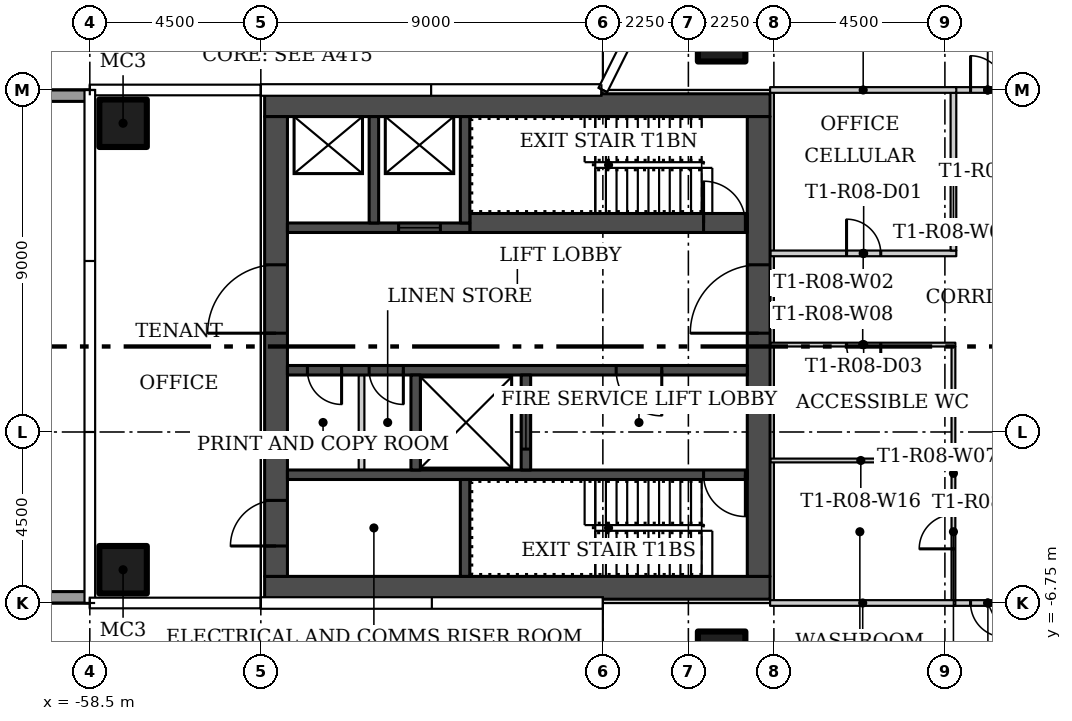
"""IFC4 building model, lengths in metres.
Left out: names, types, materials, properties, quantities, classifications, styles, units other than length and angle.
Written with IfcOpenShell. Run it as: python <this file> out.ifc"""

import sys

from ifc_helpers import new_model, si_unit, direction, frame, frame_2d, origin, origin_2d, place, context, subcontext, project, spatial, rectangle, hollow_rectangle, extrude, element, fill, save


model = new_model("IFC4")
c1 = context("Model", 3, precision=1e-05, world=origin(), true_north=direction((0.0, 1.0)))
c2 = subcontext(c1, "Body", "Model", "MODEL_VIEW")
j1 = project(units=[si_unit("LENGTHUNIT", "METRE"), si_unit("PLANEANGLEUNIT", "RADIAN")], contexts=[c1])
p1 = place(None, origin())
s1 = spatial("IfcSite", under=j1, at=p1, CompositionType="ELEMENT")
p2 = place(p1, origin())
s2 = spatial("IfcBuilding", under=s1, at=p2, CompositionType="ELEMENT")
p3 = place(p2, frame((0.0, 0.0, 81.9)))
s3 = spatial("IfcBuildingStorey", under=s2, at=p3, CompositionType="ELEMENT", Elevation=81.9)
for number, where in (
    (1, (-41.875, 8.125, 0.0)),
    (2, (-41.875, -8.125, 0.0)),
    (3, (-57.625, -5.875, 0.0)),
    (4, (-57.625, 5.875, 0.0)),
):
    element("IfcColumn", number, at=place(p3, frame(where)), inside=s3, PredefinedType="COLUMN", context=c2, shape_type="SweptSolid", body=[
        extrude(hollow_rectangle(XDim=1.25, YDim=1.25, WallThickness=0.05, at=origin_2d()), origin(), (0.0, 0.0, 1.0), 3.55),
    ])
p4 = place(p3, frame((-40.6, 2.45, 0.0)))
e5 = element("IfcWall", 5, at=p4, inside=s3, PredefinedType="PARTITIONING", context=c2, shape_type="SweptSolid", body=[
    extrude(rectangle(XDim=4.9, YDim=0.15, at=frame_2d((2.45, 0.0))), origin(), (0.0, 0.0, 1.0), 3.55),
])
p5 = place(p4, frame((2.012, 0.0, 0.0)))
e6 = element("IfcOpeningElement", 6, at=p5, cuts=e5, PredefinedType="OPENING", context=c2, shape_type="SweptSolid", body=[
    extrude(rectangle(XDim=0.9, YDim=2.1, at=frame_2d((0.45, 1.05))), frame((0.0, 0.085, 0.0), z_axis=(0.0, -1.0, 0.0), x_axis=(1.0, 0.0, 0.0)), (0.0, 0.0, 1.0), 0.17),
])
p6 = place(p3, frame((-35.775, 2.525, 0.0), z_axis=(0.0, 0.0, 1.0), x_axis=(0.0, 1.0, 0.0)))
e7 = element("IfcWall", 7, at=p6, inside=s3, PredefinedType="PARTITIONING", context=c2, shape_type="SweptSolid", body=[
    extrude(rectangle(XDim=4.15, YDim=0.15, at=frame_2d((2.075, 0.0))), origin(), (0.0, 0.0, 1.0), 3.55),
])
p7 = place(p3, frame((-35.775, -6.675, 0.0), z_axis=(0.0, 0.0, 1.0), x_axis=(0.0, 1.0, 0.0)))
e8 = element("IfcWall", 8, at=p7, inside=s3, PredefinedType="PARTITIONING", context=c2, shape_type="SweptSolid", body=[
    extrude(rectangle(XDim=6.675, YDim=0.1, at=frame_2d((3.337, 0.0))), origin(), (0.0, 0.0, 1.0), 3.55),
])
p8 = place(p7, frame((1.35, 0.0, 0.0)))
e9 = element("IfcOpeningElement", 9, at=p8, cuts=e8, PredefinedType="OPENING", context=c2, shape_type="SweptSolid", body=[
    extrude(rectangle(XDim=0.9, YDim=2.1, at=frame_2d((0.45, 1.05))), frame((0.0, 0.06, 0.0), z_axis=(0.0, -1.0, 0.0), x_axis=(1.0, 0.0, 0.0)), (0.0, 0.0, 1.0), 0.12),
])
p9 = place(p3, frame((-35.725, 0.05, 0.0), z_axis=(0.0, 0.0, 1.0), x_axis=(-1.0, 0.0, 0.0)))
e10 = element("IfcWall", 10, at=p9, inside=s3, PredefinedType="PARTITIONING", context=c2, shape_type="SweptSolid", body=[
    extrude(rectangle(XDim=4.875, YDim=0.1, at=frame_2d((2.438, 0.0))), origin(), (0.0, 0.0, 1.0), 3.55),
])
p10 = place(p9, frame((1.962, 0.0, 0.0)))
e11 = element("IfcOpeningElement", 11, at=p10, cuts=e10, PredefinedType="OPENING", context=c2, shape_type="SweptSolid", body=[
    extrude(rectangle(XDim=0.9, YDim=2.1, at=frame_2d((0.45, 1.05))), frame((0.0, 0.06, 0.0), z_axis=(0.0, -1.0, 0.0), x_axis=(1.0, 0.0, 0.0)), (0.0, 0.0, 1.0), 0.12),
])
p11 = place(p3, frame((-35.85, 6.75, 0.0)))
e12 = element("IfcWall", 12, at=p11, inside=s3, PredefinedType="PARTITIONING", context=c2, shape_type="SweptSolid", body=[
    extrude(rectangle(XDim=1.951, YDim=0.15, at=frame_2d((0.975, 0.0))), origin(), (0.0, 0.0, 1.0), 3.55),
])
p12 = place(p11, frame((0.525, 0.0, 0.0)))
e13 = element("IfcOpeningElement", 13, at=p12, cuts=e12, PredefinedType="OPENING", context=c2, shape_type="SweptSolid", body=[
    extrude(rectangle(XDim=0.9, YDim=2.1, at=frame_2d((0.45, 1.05))), frame((0.0, 0.085, 0.0), z_axis=(0.0, -1.0, 0.0), x_axis=(1.0, 0.0, 0.0)), (0.0, 0.0, 1.0), 0.17),
])
p13 = place(p3, frame((-33.912, -6.75, 0.0), z_axis=(0.0, 0.0, 1.0), x_axis=(-1.0, 0.0, 0.0)))
e14 = element("IfcWall", 14, at=p13, inside=s3, PredefinedType="PARTITIONING", context=c2, shape_type="SweptSolid", body=[
    extrude(rectangle(XDim=1.913, YDim=0.15, at=frame_2d((0.957, 0.0))), origin(), (0.0, 0.0, 1.0), 3.55),
])
p14 = place(p13, frame((0.513, 0.0, 0.0)))
e15 = element("IfcOpeningElement", 15, at=p14, cuts=e14, PredefinedType="OPENING", context=c2, shape_type="SweptSolid", body=[
    extrude(rectangle(XDim=0.9, YDim=2.1, at=frame_2d((0.45, 1.05))), frame((0.0, 0.085, 0.0), z_axis=(0.0, -1.0, 0.0), x_axis=(1.0, 0.0, 0.0)), (0.0, 0.0, 1.0), 0.17),
])
p15 = place(p3, frame((-35.7, 6.75, 0.0), z_axis=(0.0, 0.0, 1.0), x_axis=(-1.0, 0.0, 0.0)))
e16 = element("IfcWall", 16, at=p15, inside=s3, PredefinedType="PARTITIONING", context=c2, shape_type="SweptSolid", body=[
    extrude(rectangle(XDim=4.9, YDim=0.15, at=frame_2d((2.45, 0.0))), origin(), (0.0, 0.0, 1.0), 3.55),
])
p16 = place(p3, frame((-40.6, -6.75, 0.0)))
e17 = element("IfcWall", 17, at=p16, inside=s3, PredefinedType="PARTITIONING", context=c2, shape_type="SweptSolid", body=[
    extrude(rectangle(XDim=4.875, YDim=0.15, at=frame_2d((2.438, 0.0))), origin(), (0.0, 0.0, 1.0), 3.55),
])
p17 = place(p3, frame((-35.825, -3.0, 0.0), z_axis=(0.0, 0.0, 1.0), x_axis=(-1.0, 0.0, 0.0)))
e18 = element("IfcWall", 18, at=p17, inside=s3, PredefinedType="PARTITIONING", context=c2, shape_type="SweptSolid", body=[
    extrude(rectangle(XDim=4.775, YDim=0.1, at=frame_2d((2.387, 0.0))), origin(), (0.0, 0.0, 1.0), 3.55),
])
p18 = place(p3, frame((-58.5, 6.6, 0.0), z_axis=(0.0, 0.0, 1.0), x_axis=(-1.0, 0.0, 0.0)))
e19 = element("IfcWall", 19, at=p18, inside=s3, PredefinedType="PARAPET", context=c2, shape_type="SweptSolid", body=[
    extrude(rectangle(XDim=4.5, YDim=0.3, at=frame_2d((2.25, 0.0))), origin(), (0.0, 0.0, 1.0), 1.1),
])
p19 = place(p3, frame((-62.7, -6.6, 0.0)))
e20 = element("IfcWall", 20, at=p19, inside=s3, PredefinedType="PARAPET", context=c2, shape_type="SweptSolid", body=[
    extrude(rectangle(XDim=4.2, YDim=0.3, at=frame_2d((2.1, 0.0))), origin(), (0.0, 0.0, 1.0), 1.1),
])
for number, where, z_axis, x_axis in (
    (21, (-40.6, -6.35, 0.0), (0.0, 0.0, 1.0), (-1.0, 0.0, 0.0)),
    (22, (-40.6, 6.35, 0.0), (0.0, 0.0, 1.0), (-1.0, 0.0, 0.0)),
):
    element("IfcWall", number, at=place(p3, frame(where, z_axis=z_axis, x_axis=x_axis)), inside=s3, PredefinedType="SHEAR", context=c2, shape_type="SweptSolid", body=[
        extrude(rectangle(XDim=13.3, YDim=0.6, at=frame_2d((6.65, 0.0))), origin(), (0.0, 0.0, 1.0), 3.55),
    ])
p20 = place(p3, frame((-40.9, -6.05, 0.0), z_axis=(0.0, 0.0, 1.0), x_axis=(0.0, 1.0, 0.0)))
e23 = element("IfcWall", 23, at=p20, inside=s3, PredefinedType="SHEAR", context=c2, shape_type="SweptSolid", body=[
    extrude(rectangle(XDim=12.1, YDim=0.6, at=frame_2d((6.05, 0.0))), origin(), (0.0, 0.0, 1.0), 3.55),
])
p21 = place(p20, frame((6.4, 0.0, 0.0)))
e24 = element("IfcOpeningElement", 24, at=p21, cuts=e23, PredefinedType="OPENING", context=c2, shape_type="SweptSolid", body=[
    extrude(rectangle(XDim=1.8, YDim=2.4, at=frame_2d((0.9, 1.2))), frame((0.0, 0.31, 0.0), z_axis=(0.0, -1.0, 0.0), x_axis=(1.0, 0.0, 0.0)), (0.0, 0.0, 1.0), 0.62),
])
p22 = place(p3, frame((-53.6, -6.05, 0.0), z_axis=(0.0, 0.0, 1.0), x_axis=(0.0, 1.0, 0.0)))
e25 = element("IfcWall", 25, at=p22, inside=s3, PredefinedType="SHEAR", context=c2, shape_type="SweptSolid", body=[
    extrude(rectangle(XDim=12.1, YDim=0.6, at=frame_2d((6.05, 0.0))), origin(), (0.0, 0.0, 1.0), 3.55),
])
p23 = place(p22, frame((0.8, 0.0, 0.0)))
e26 = element("IfcOpeningElement", 26, at=p23, cuts=e25, PredefinedType="OPENING", context=c2, shape_type="SweptSolid", body=[
    extrude(rectangle(XDim=1.2, YDim=2.1, at=frame_2d((0.6, 1.05))), frame((0.0, 0.31, 0.0), z_axis=(0.0, -1.0, 0.0), x_axis=(1.0, 0.0, 0.0)), (0.0, 0.0, 1.0), 0.62),
])
p24 = place(p22, frame((6.4, 0.0, 0.0)))
e27 = element("IfcOpeningElement", 27, at=p24, cuts=e25, PredefinedType="OPENING", context=c2, shape_type="SweptSolid", body=[
    extrude(rectangle(XDim=1.8, YDim=2.4, at=frame_2d((0.9, 1.2))), frame((0.0, 0.31, 0.0), z_axis=(0.0, -1.0, 0.0), x_axis=(1.0, 0.0, 0.0)), (0.0, 0.0, 1.0), 0.62),
])
p25 = place(p3, frame((-41.2, -3.375, 0.0), z_axis=(0.0, 0.0, 1.0), x_axis=(-1.0, 0.0, 0.0)))
e28 = element("IfcWall", 28, at=p25, inside=s3, PredefinedType="SHEAR", context=c2, shape_type="SweptSolid", body=[
    extrude(rectangle(XDim=12.1, YDim=0.25, at=frame_2d((6.05, 0.0))), origin(), (0.0, 0.0, 1.0), 3.55),
])
p26 = place(p25, frame((0.05, 0.0, 0.0)))
e29 = element("IfcOpeningElement", 29, at=p26, cuts=e28, PredefinedType="OPENING", context=c2, shape_type="SweptSolid", body=[
    extrude(rectangle(XDim=1.1, YDim=2.1, at=frame_2d((0.55, 1.05))), frame((0.0, 0.135, 0.0), z_axis=(0.0, -1.0, 0.0), x_axis=(1.0, 0.0, 0.0)), (0.0, 0.0, 1.0), 0.27),
])
p27 = place(p3, frame((-48.625, -6.05, 0.0), z_axis=(0.0, 0.0, 1.0), x_axis=(0.0, 1.0, 0.0)))
e30 = element("IfcWall", 30, at=p27, inside=s3, PredefinedType="SHEAR", context=c2, shape_type="SweptSolid", body=[
    extrude(rectangle(XDim=2.55, YDim=0.25, at=frame_2d((1.275, 0.0))), origin(), (0.0, 0.0, 1.0), 3.55),
])
p28 = place(p3, frame((-41.2, -0.625, 0.0), z_axis=(0.0, 0.0, 1.0), x_axis=(-1.0, 0.0, 0.0)))
e31 = element("IfcWall", 31, at=p28, inside=s3, PredefinedType="SHEAR", context=c2, shape_type="SweptSolid", body=[
    extrude(rectangle(XDim=12.1, YDim=0.25, at=frame_2d((6.05, 0.0))), origin(), (0.0, 0.0, 1.0), 3.55),
])
p29 = place(p28, frame((2.25, 0.0, 0.0)))
e32 = element("IfcOpeningElement", 32, at=p29, cuts=e31, PredefinedType="OPENING", context=c2, shape_type="SweptSolid", body=[
    extrude(rectangle(XDim=1.2, YDim=2.1, at=frame_2d((0.6, 1.05))), frame((0.0, 0.135, 0.0), z_axis=(0.0, -1.0, 0.0), x_axis=(1.0, 0.0, 0.0)), (0.0, 0.0, 1.0), 0.27),
])
p30 = place(p28, frame((9.05, 0.0, 0.0)))
e33 = element("IfcOpeningElement", 33, at=p30, cuts=e31, PredefinedType="OPENING", context=c2, shape_type="SweptSolid", body=[
    extrude(rectangle(XDim=0.9, YDim=2.1, at=frame_2d((0.45, 1.05))), frame((0.0, 0.135, 0.0), z_axis=(0.0, -1.0, 0.0), x_axis=(1.0, 0.0, 0.0)), (0.0, 0.0, 1.0), 0.27),
])
p31 = place(p28, frame((10.675, 0.0, 0.0)))
e34 = element("IfcOpeningElement", 34, at=p31, cuts=e31, PredefinedType="OPENING", context=c2, shape_type="SweptSolid", body=[
    extrude(rectangle(XDim=0.9, YDim=2.1, at=frame_2d((0.45, 1.05))), frame((0.0, 0.135, 0.0), z_axis=(0.0, -1.0, 0.0), x_axis=(1.0, 0.0, 0.0)), (0.0, 0.0, 1.0), 0.27),
])
p32 = place(p3, frame((-47.025, -3.25, 0.0), z_axis=(0.0, 0.0, 1.0), x_axis=(0.0, 1.0, 0.0)))
e35 = element("IfcWall", 35, at=p32, inside=s3, PredefinedType="SHEAR", context=c2, shape_type="SweptSolid", body=[
    extrude(rectangle(XDim=2.5, YDim=0.25, at=frame_2d((1.25, 0.0))), origin(), (0.0, 0.0, 1.0), 3.55),
])
p33 = place(p32, frame((0.55, 0.0, 0.0)))
e36 = element("IfcOpeningElement", 36, at=p33, cuts=e35, PredefinedType="OPENING", context=c2, shape_type="SweptSolid", body=[
    extrude(rectangle(XDim=1.4, YDim=2.4, at=frame_2d((0.7, 1.2))), frame((0.0, 0.135, 0.0), z_axis=(0.0, -1.0, 0.0), x_axis=(1.0, 0.0, 0.0)), (0.0, 0.0, 1.0), 0.27),
])
p34 = place(p3, frame((-49.925, -3.25, 0.0), z_axis=(0.0, 0.0, 1.0), x_axis=(0.0, 1.0, 0.0)))
e37 = element("IfcWall", 37, at=p34, inside=s3, PredefinedType="SHEAR", context=c2, shape_type="SweptSolid", body=[
    extrude(rectangle(XDim=2.5, YDim=0.25, at=frame_2d((1.25, 0.0))), origin(), (0.0, 0.0, 1.0), 3.55),
])
p35 = place(p3, frame((-51.35, -3.25, 0.0), z_axis=(0.0, 0.0, 1.0), x_axis=(0.0, 1.0, 0.0)))
e38 = element("IfcWall", 38, at=p35, inside=s3, PredefinedType="PARTITIONING", context=c2, shape_type="SweptSolid", body=[
    extrude(rectangle(XDim=2.5, YDim=0.15, at=frame_2d((1.25, 0.0))), origin(), (0.0, 0.0, 1.0), 3.55),
])
p36 = place(p3, frame((-48.5, 3.25, 0.0)))
e39 = element("IfcWall", 39, at=p36, inside=s3, PredefinedType="SHEAR", context=c2, shape_type="SweptSolid", body=[
    extrude(rectangle(XDim=7.3, YDim=0.5, at=frame_2d((3.65, 0.0))), origin(), (0.0, 0.0, 1.0), 3.55),
])
p37 = place(p36, frame((6.15, 0.0, 0.0)))
e40 = element("IfcOpeningElement", 40, at=p37, cuts=e39, PredefinedType="OPENING", context=c2, shape_type="SweptSolid", body=[
    extrude(rectangle(XDim=1.1, YDim=2.1, at=frame_2d((0.55, 1.05))), frame((0.0, 0.26, 0.0), z_axis=(0.0, -1.0, 0.0), x_axis=(1.0, 0.0, 0.0)), (0.0, 0.0, 1.0), 0.52),
])
p38 = place(p3, frame((-48.5, 3.125, 0.0), z_axis=(0.0, 0.0, 1.0), x_axis=(-1.0, 0.0, 0.0)))
e41 = element("IfcWall", 41, at=p38, inside=s3, PredefinedType="SHEAR", context=c2, shape_type="SweptSolid", body=[
    extrude(rectangle(XDim=4.8, YDim=0.25, at=frame_2d((2.4, 0.0))), origin(), (0.0, 0.0, 1.0), 3.55),
])
p39 = place(p38, frame((0.775, 0.0, 0.0)))
e42 = element("IfcOpeningElement", 42, at=p39, cuts=e41, PredefinedType="OPENING", context=c2, shape_type="SweptSolid", body=[
    extrude(rectangle(XDim=1.1, YDim=2.1, at=frame_2d((0.55, 1.05))), frame((0.0, 0.135, 0.0), z_axis=(0.0, -1.0, 0.0), x_axis=(1.0, 0.0, 0.0)), (0.0, 0.0, 1.0), 0.27),
])
for number, where, z_axis, x_axis in (
    (43, (-48.625, 3.25, 0.0), (0.0, 0.0, 1.0), (0.0, 1.0, 0.0)),
    (44, (-51.025, 3.25, 0.0), (0.0, 0.0, 1.0), (0.0, 1.0, 0.0)),
):
    element("IfcWall", number, at=place(p3, frame(where, z_axis=z_axis, x_axis=x_axis)), inside=s3, PredefinedType="SHEAR", context=c2, shape_type="SweptSolid", body=[
        extrude(rectangle(XDim=2.8, YDim=0.25, at=frame_2d((1.4, 0.0))), origin(), (0.0, 0.0, 1.0), 3.55),
    ])
p40 = place(p5, origin())
e45 = element("IfcDoor", 45, at=p40, inside=s3, OperationType="SINGLE_SWING_LEFT", PredefinedType="DOOR", context=c2, shape_type="SweptSolid", body=[
    extrude(rectangle(XDim=0.9, YDim=2.1, at=frame_2d((0.45, 1.05))), frame((0.0, 0.025, 0.0), z_axis=(0.0, -1.0, 0.0), x_axis=(1.0, 0.0, 0.0)), (0.0, 0.0, 1.0), 0.05),
])
fill(e6, e45)
p41 = place(p8, origin())
e46 = element("IfcDoor", 46, at=p41, inside=s3, OperationType="SINGLE_SWING_RIGHT", PredefinedType="DOOR", context=c2, shape_type="SweptSolid", body=[
    extrude(rectangle(XDim=0.9, YDim=2.1, at=frame_2d((0.45, 1.05))), frame((0.0, 0.025, 0.0), z_axis=(0.0, -1.0, 0.0), x_axis=(1.0, 0.0, 0.0)), (0.0, 0.0, 1.0), 0.05),
])
fill(e9, e46)
p42 = place(p10, origin())
e47 = element("IfcDoor", 47, at=p42, inside=s3, OperationType="SINGLE_SWING_RIGHT", PredefinedType="DOOR", context=c2, shape_type="SweptSolid", body=[
    extrude(rectangle(XDim=0.9, YDim=2.1, at=frame_2d((0.45, 1.05))), frame((0.0, 0.025, 0.0), z_axis=(0.0, -1.0, 0.0), x_axis=(1.0, 0.0, 0.0)), (0.0, 0.0, 1.0), 0.05),
])
fill(e11, e47)
p43 = place(p12, origin())
e48 = element("IfcDoor", 48, at=p43, inside=s3, OperationType="SINGLE_SWING_LEFT", PredefinedType="DOOR", context=c2, shape_type="SweptSolid", body=[
    extrude(rectangle(XDim=0.9, YDim=2.1, at=frame_2d((0.45, 1.05))), frame((0.0, 0.025, 0.0), z_axis=(0.0, -1.0, 0.0), x_axis=(1.0, 0.0, 0.0)), (0.0, 0.0, 1.0), 0.05),
])
fill(e13, e48)
p44 = place(p14, origin())
e49 = element("IfcDoor", 49, at=p44, inside=s3, OperationType="SINGLE_SWING_RIGHT", PredefinedType="DOOR", context=c2, shape_type="SweptSolid", body=[
    extrude(rectangle(XDim=0.9, YDim=2.1, at=frame_2d((0.45, 1.05))), frame((0.0, 0.025, 0.0), z_axis=(0.0, -1.0, 0.0), x_axis=(1.0, 0.0, 0.0)), (0.0, 0.0, 1.0), 0.05),
])
fill(e15, e49)
p45 = place(p21, origin())
e50 = element("IfcDoor", 50, at=p45, inside=s3, OperationType="DOUBLE_DOOR_SINGLE_SWING", PredefinedType="DOOR", context=c2, shape_type="SweptSolid", body=[
    extrude(rectangle(XDim=1.8, YDim=2.4, at=frame_2d((0.9, 1.2))), frame((0.0, 0.025, 0.0), z_axis=(0.0, -1.0, 0.0), x_axis=(1.0, 0.0, 0.0)), (0.0, 0.0, 1.0), 0.05),
])
fill(e24, e50)
p46 = place(p23, origin())
e51 = element("IfcDoor", 51, at=p46, inside=s3, OperationType="SINGLE_SWING_LEFT", PredefinedType="DOOR", context=c2, shape_type="SweptSolid", body=[
    extrude(rectangle(XDim=1.2, YDim=2.1, at=frame_2d((0.6, 1.05))), frame((0.0, 0.025, 0.0), z_axis=(0.0, -1.0, 0.0), x_axis=(1.0, 0.0, 0.0)), (0.0, 0.0, 1.0), 0.05),
])
fill(e26, e51)
p47 = place(p24, origin())
e52 = element("IfcDoor", 52, at=p47, inside=s3, OperationType="DOUBLE_DOOR_SINGLE_SWING", PredefinedType="DOOR", context=c2, shape_type="SweptSolid", body=[
    extrude(rectangle(XDim=1.8, YDim=2.4, at=frame_2d((0.9, 1.2))), frame((0.0, 0.025, 0.0), z_axis=(0.0, -1.0, 0.0), x_axis=(1.0, 0.0, 0.0)), (0.0, 0.0, 1.0), 0.05),
])
fill(e27, e52)
p48 = place(p26, origin())
e53 = element("IfcDoor", 53, at=p48, inside=s3, OperationType="SINGLE_SWING_LEFT", PredefinedType="DOOR", context=c2, shape_type="SweptSolid", body=[
    extrude(rectangle(XDim=1.1, YDim=2.1, at=frame_2d((0.55, 1.05))), frame((0.0, 0.025, 0.0), z_axis=(0.0, -1.0, 0.0), x_axis=(1.0, 0.0, 0.0)), (0.0, 0.0, 1.0), 0.05),
])
fill(e29, e53)
p49 = place(p29, origin())
e54 = element("IfcDoor", 54, at=p49, inside=s3, OperationType="SINGLE_SWING_LEFT", PredefinedType="DOOR", context=c2, shape_type="SweptSolid", body=[
    extrude(rectangle(XDim=1.2, YDim=2.1, at=frame_2d((0.6, 1.05))), frame((0.0, 0.025, 0.0), z_axis=(0.0, -1.0, 0.0), x_axis=(1.0, 0.0, 0.0)), (0.0, 0.0, 1.0), 0.05),
])
fill(e32, e54)
p50 = place(p30, origin())
e55 = element("IfcDoor", 55, at=p50, inside=s3, OperationType="SINGLE_SWING_RIGHT", PredefinedType="DOOR", context=c2, shape_type="SweptSolid", body=[
    extrude(rectangle(XDim=0.9, YDim=2.1, at=frame_2d((0.45, 1.05))), frame((0.0, 0.025, 0.0), z_axis=(0.0, -1.0, 0.0), x_axis=(1.0, 0.0, 0.0)), (0.0, 0.0, 1.0), 0.05),
])
fill(e33, e55)
p51 = place(p31, origin())
e56 = element("IfcDoor", 56, at=p51, inside=s3, OperationType="SINGLE_SWING_RIGHT", PredefinedType="DOOR", context=c2, shape_type="SweptSolid", body=[
    extrude(rectangle(XDim=0.9, YDim=2.1, at=frame_2d((0.45, 1.05))), frame((0.0, 0.025, 0.0), z_axis=(0.0, -1.0, 0.0), x_axis=(1.0, 0.0, 0.0)), (0.0, 0.0, 1.0), 0.05),
])
fill(e34, e56)
p52 = place(p33, origin())
e57 = element("IfcDoor", 57, at=p52, inside=s3, OperationType="SLIDING_TO_LEFT", PredefinedType="DOOR", context=c2, shape_type="SweptSolid", body=[
    extrude(rectangle(XDim=1.4, YDim=2.4, at=frame_2d((0.7, 1.2))), frame((0.0, 0.025, 0.0), z_axis=(0.0, -1.0, 0.0), x_axis=(1.0, 0.0, 0.0)), (0.0, 0.0, 1.0), 0.05),
])
fill(e36, e57)
p53 = place(p37, origin())
e58 = element("IfcDoor", 58, at=p53, inside=s3, OperationType="SINGLE_SWING_RIGHT", PredefinedType="DOOR", context=c2, shape_type="SweptSolid", body=[
    extrude(rectangle(XDim=1.1, YDim=2.1, at=frame_2d((0.55, 1.05))), frame((0.0, 0.025, 0.0), z_axis=(0.0, -1.0, 0.0), x_axis=(1.0, 0.0, 0.0)), (0.0, 0.0, 1.0), 0.05),
])
fill(e40, e58)
p54 = place(p39, origin())
e59 = element("IfcDoor", 59, at=p54, inside=s3, OperationType="SLIDING_TO_LEFT", PredefinedType="DOOR", context=c2, shape_type="SweptSolid", body=[
    extrude(rectangle(XDim=1.1, YDim=2.1, at=frame_2d((0.55, 1.05))), frame((0.0, 0.025, 0.0), z_axis=(0.0, -1.0, 0.0), x_axis=(1.0, 0.0, 0.0)), (0.0, 0.0, 1.0), 0.05),
])
fill(e42, e59)
save(model, sys.argv[1])
